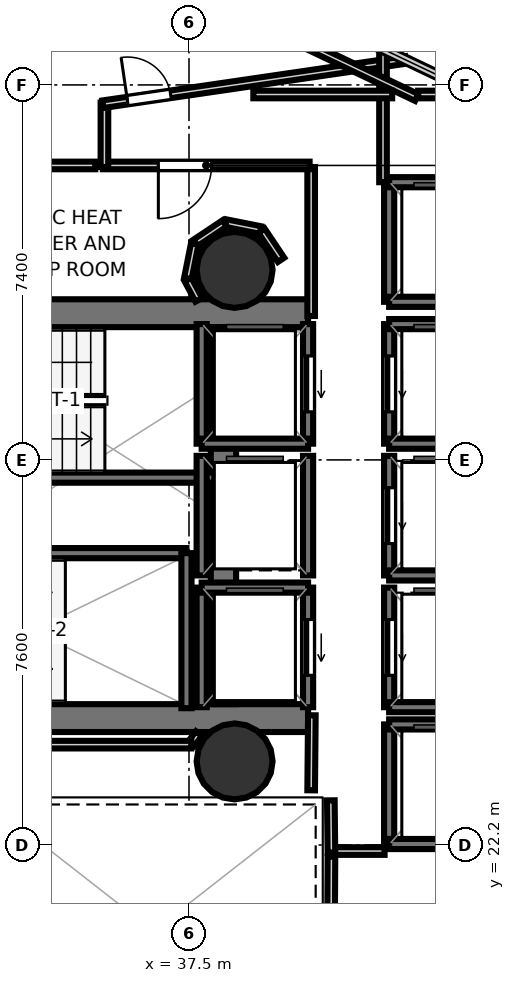
"""IFC4 building model, lengths in metres.
Left out: names, types, materials, properties, quantities, classifications, styles, units other than length and angle.
Written with IfcOpenShell. Run it as: python <this file> out.ifc"""

import sys

from ifc_helpers import new_model, si_unit, direction, frame, frame_2d, origin, origin_2d, place, context, subcontext, project, spatial, rectangle, hollow_circle, extrude, element, fill, save


model = new_model("IFC4")
c1 = context("Model", 3, precision=1e-05, world=origin(), true_north=direction((0.0, 1.0)))
c2 = subcontext(c1, "Body", "Model", "MODEL_VIEW")
j1 = project(units=[si_unit("LENGTHUNIT", "METRE"), si_unit("PLANEANGLEUNIT", "RADIAN")], contexts=[c1])
p1 = place(None, origin())
s1 = spatial("IfcSite", under=j1, at=p1, CompositionType="ELEMENT")
p2 = place(p1, origin())
s2 = spatial("IfcBuilding", under=s1, at=p2, CompositionType="ELEMENT")
p3 = place(p2, frame((0.0, 0.0, 138.5)))
s3 = spatial("IfcBuildingStorey", under=s2, at=p3, CompositionType="ELEMENT", Elevation=138.5)
p4 = place(p3, frame((29.23, 32.695, 0.0), z_axis=(0.0, 0.0, 1.0), x_axis=(1.0, 0.0, 0.0)))
e1 = element("IfcWall", 1, at=p4, inside=s3, PredefinedType="SHEAR", context=c2, shape_type="SweptSolid", body=[
    extrude(rectangle(XDim=10.62, YDim=0.55, at=frame_2d((5.31, 0.0))), origin(), (0.0, 0.0, 1.0), 4.38),
])
p5 = place(p4, frame((0.995, 0.0, 0.0)))
e2 = element("IfcOpeningElement", 2, at=p5, cuts=e1, PredefinedType="OPENING", context=c2, shape_type="SweptSolid", body=[
    extrude(rectangle(XDim=1.25, YDim=2.15, at=frame_2d((0.625, 1.075))), frame((0.0, 0.285, 0.0), z_axis=(0.0, -1.0, 0.0), x_axis=(1.0, 0.0, 0.0)), (0.0, 0.0, 1.0), 0.57),
])
p6 = place(p3, frame((29.23, 24.705, 0.0), z_axis=(0.0, 0.0, 1.0), x_axis=(1.0, 0.0, 0.0)))
e3 = element("IfcWall", 3, at=p6, inside=s3, PredefinedType="SHEAR", context=c2, shape_type="SweptSolid", body=[
    extrude(rectangle(XDim=10.62, YDim=0.55, at=frame_2d((5.31, 0.0))), origin(), (0.0, 0.0, 1.0), 4.38),
])
p7 = place(p6, frame((0.795, 0.0, 0.0)))
e4 = element("IfcOpeningElement", 4, at=p7, cuts=e3, PredefinedType="OPENING", context=c2, shape_type="SweptSolid", body=[
    extrude(rectangle(XDim=1.25, YDim=2.15, at=frame_2d((0.625, 1.075))), frame((0.0, 0.285, 0.0), z_axis=(0.0, -1.0, 0.0), x_axis=(1.0, 0.0, 0.0)), (0.0, 0.0, 1.0), 0.57),
])
p8 = place(p3, frame((38.18, 24.98, 0.0), z_axis=(0.0, 0.0, 1.0), x_axis=(0.0, 1.0, 0.0)))
e5 = element("IfcWall", 5, at=p8, inside=s3, PredefinedType="SHEAR", context=c2, shape_type="SweptSolid", body=[
    extrude(rectangle(XDim=7.44, YDim=0.5, at=frame_2d((3.72, 0.0))), origin(), (0.0, 0.0, 1.0), 4.38),
])
for number, where, z_axis, x_axis in (
    (6, (38.4, 33.55, 0.0), (0.0, 0.0, 1.0), (1.0, 0.0, 0.0)),
    (7, (38.4, 23.85, 0.0), (0.0, 0.0, 1.0), (1.0, 0.0, 0.0)),
):
    element("IfcColumn", number, at=place(p3, frame(where, z_axis=z_axis, x_axis=x_axis)), inside=s3, PredefinedType="COLUMN", context=c2, shape_type="SweptSolid", body=[
        extrude(hollow_circle(Radius=0.75, WallThickness=0.036, at=origin_2d()), origin(), (0.0, 0.0, 1.0), 4.6),
    ])
p9 = place(p3, frame((29.7, 29.45, 0.0), z_axis=(0.0, 0.0, 1.0), x_axis=(1.0, 0.0, 0.0)))
e8 = element("IfcWall", 8, at=p9, inside=s3, PredefinedType="SOLIDWALL", context=c2, shape_type="SweptSolid", body=[
    extrude(rectangle(XDim=8.3, YDim=0.2, at=frame_2d((4.15, 0.0))), origin(), (0.0, 0.0, 1.0), 4.38),
])
p10 = place(p3, frame((29.7, 27.96, 0.0), z_axis=(0.0, 0.0, 1.0), x_axis=(1.0, 0.0, 0.0)))
e9 = element("IfcWall", 9, at=p10, inside=s3, PredefinedType="SOLIDWALL", context=c2, shape_type="SweptSolid", body=[
    extrude(rectangle(XDim=7.75, YDim=0.2, at=frame_2d((3.875, 0.0))), origin(), (0.0, 0.0, 1.0), 4.38),
])
p11 = place(p3, frame((37.45, 24.9, 0.0), z_axis=(0.0, 0.0, 1.0), x_axis=(0.0, 1.0, 0.0)))
e10 = element("IfcWall", 10, at=p11, inside=s3, PredefinedType="SOLIDWALL", context=c2, shape_type="SweptSolid", body=[
    extrude(rectangle(XDim=3.06, YDim=0.2, at=frame_2d((1.53, 0.0))), origin(), (0.0, 0.0, 1.0), 4.38),
])
p12 = place(p3, frame((39.85, 30.12, 0.0), z_axis=(0.0, 0.0, 1.0), x_axis=(0.0, 1.0, 0.0)))
e11 = element("IfcWall", 11, at=p12, inside=s3, PredefinedType="SOLIDWALL", context=c2, shape_type="SweptSolid", body=[
    extrude(rectangle(XDim=2.36, YDim=0.2, at=frame_2d((1.18, 0.0))), origin(), (0.0, 0.0, 1.0), 4.38),
])
p13 = place(p12, frame((0.63, 0.0, 0.0)))
e12 = element("IfcOpeningElement", 12, at=p13, cuts=e11, PredefinedType="OPENING", context=c2, shape_type="SweptSolid", body=[
    extrude(rectangle(XDim=1.1, YDim=2.15, at=frame_2d((0.55, 1.075))), frame((0.0, 0.11, 0.0), z_axis=(0.0, -1.0, 0.0), x_axis=(1.0, 0.0, 0.0)), (0.0, 0.0, 1.0), 0.22),
])
p14 = place(p3, frame((37.75, 30.12, 0.0), z_axis=(0.0, 0.0, 1.0), x_axis=(0.0, 1.0, 0.0)))
e13 = element("IfcWall", 13, at=p14, inside=s3, PredefinedType="SOLIDWALL", context=c2, shape_type="SweptSolid", body=[
    extrude(rectangle(XDim=2.36, YDim=0.2, at=frame_2d((1.18, 0.0))), origin(), (0.0, 0.0, 1.0), 4.38),
])
p15 = place(p3, frame((37.75, 30.12, 0.0), z_axis=(0.0, 0.0, 1.0), x_axis=(1.0, 0.0, 0.0)))
e14 = element("IfcWall", 14, at=p15, inside=s3, PredefinedType="SOLIDWALL", context=c2, shape_type="SweptSolid", body=[
    extrude(rectangle(XDim=2.1, YDim=0.2, at=frame_2d((1.05, 0.0))), origin(), (0.0, 0.0, 1.0), 4.38),
])
p16 = place(p3, frame((39.85, 24.92, 0.0), z_axis=(0.0, 0.0, 1.0), x_axis=(0.0, 1.0, 0.0)))
e15 = element("IfcWall", 15, at=p16, inside=s3, PredefinedType="SOLIDWALL", context=c2, shape_type="SweptSolid", body=[
    extrude(rectangle(XDim=2.36, YDim=0.2, at=frame_2d((1.18, 0.0))), origin(), (0.0, 0.0, 1.0), 4.38),
])
p17 = place(p16, frame((0.63, 0.0, 0.0)))
e16 = element("IfcOpeningElement", 16, at=p17, cuts=e15, PredefinedType="OPENING", context=c2, shape_type="SweptSolid", body=[
    extrude(rectangle(XDim=1.1, YDim=2.15, at=frame_2d((0.55, 1.075))), frame((0.0, 0.11, 0.0), z_axis=(0.0, -1.0, 0.0), x_axis=(1.0, 0.0, 0.0)), (0.0, 0.0, 1.0), 0.22),
])
p18 = place(p3, frame((37.75, 24.92, 0.0), z_axis=(0.0, 0.0, 1.0), x_axis=(0.0, 1.0, 0.0)))
e17 = element("IfcWall", 17, at=p18, inside=s3, PredefinedType="SOLIDWALL", context=c2, shape_type="SweptSolid", body=[
    extrude(rectangle(XDim=2.36, YDim=0.2, at=frame_2d((1.18, 0.0))), origin(), (0.0, 0.0, 1.0), 4.38),
])
p19 = place(p3, frame((37.75, 27.28, 0.0), z_axis=(0.0, 0.0, 1.0), x_axis=(1.0, 0.0, 0.0)))
e18 = element("IfcWall", 18, at=p19, inside=s3, PredefinedType="SOLIDWALL", context=c2, shape_type="SweptSolid", body=[
    extrude(rectangle(XDim=2.1, YDim=0.2, at=frame_2d((1.05, 0.0))), origin(), (0.0, 0.0, 1.0), 4.38),
])
p20 = place(p3, frame((41.45, 30.12, 0.0), z_axis=(0.0, 0.0, 1.0), x_axis=(0.0, 1.0, 0.0)))
e19 = element("IfcWall", 19, at=p20, inside=s3, PredefinedType="SOLIDWALL", context=c2, shape_type="SweptSolid", body=[
    extrude(rectangle(XDim=2.36, YDim=0.2, at=frame_2d((1.18, 0.0))), origin(), (0.0, 0.0, 1.0), 4.38),
])
p21 = place(p20, frame((0.63, 0.0, 0.0)))
e20 = element("IfcOpeningElement", 20, at=p21, cuts=e19, PredefinedType="OPENING", context=c2, shape_type="SweptSolid", body=[
    extrude(rectangle(XDim=1.1, YDim=2.15, at=frame_2d((0.55, 1.075))), frame((0.0, 0.11, 0.0), z_axis=(0.0, -1.0, 0.0), x_axis=(1.0, 0.0, 0.0)), (0.0, 0.0, 1.0), 0.22),
])
for number, where, z_axis, x_axis in (
    (21, (41.45, 32.48, 0.0), (0.0, 0.0, 1.0), (1.0, 0.0, 0.0)),
    (22, (41.45, 30.12, 0.0), (0.0, 0.0, 1.0), (1.0, 0.0, 0.0)),
):
    element("IfcWall", number, at=place(p3, frame(where, z_axis=z_axis, x_axis=x_axis)), inside=s3, PredefinedType="SOLIDWALL", context=c2, shape_type="SweptSolid", body=[
        extrude(rectangle(XDim=2.1, YDim=0.2, at=frame_2d((1.05, 0.0))), origin(), (0.0, 0.0, 1.0), 4.38),
    ])
p22 = place(p3, frame((41.45, 27.52, 0.0), z_axis=(0.0, 0.0, 1.0), x_axis=(0.0, 1.0, 0.0)))
e23 = element("IfcWall", 23, at=p22, inside=s3, PredefinedType="SOLIDWALL", context=c2, shape_type="SweptSolid", body=[
    extrude(rectangle(XDim=2.36, YDim=0.2, at=frame_2d((1.18, 0.0))), origin(), (0.0, 0.0, 1.0), 4.38),
])
p23 = place(p22, frame((0.63, 0.0, 0.0)))
e24 = element("IfcOpeningElement", 24, at=p23, cuts=e23, PredefinedType="OPENING", context=c2, shape_type="SweptSolid", body=[
    extrude(rectangle(XDim=1.1, YDim=2.15, at=frame_2d((0.55, 1.075))), frame((0.0, 0.11, 0.0), z_axis=(0.0, -1.0, 0.0), x_axis=(1.0, 0.0, 0.0)), (0.0, 0.0, 1.0), 0.22),
])
p24 = place(p3, frame((41.45, 27.52, 0.0), z_axis=(0.0, 0.0, 1.0), x_axis=(1.0, 0.0, 0.0)))
e25 = element("IfcWall", 25, at=p24, inside=s3, PredefinedType="SOLIDWALL", context=c2, shape_type="SweptSolid", body=[
    extrude(rectangle(XDim=2.1, YDim=0.2, at=frame_2d((1.05, 0.0))), origin(), (0.0, 0.0, 1.0), 4.38),
])
p25 = place(p3, frame((41.45, 24.92, 0.0), z_axis=(0.0, 0.0, 1.0), x_axis=(0.0, 1.0, 0.0)))
e26 = element("IfcWall", 26, at=p25, inside=s3, PredefinedType="SOLIDWALL", context=c2, shape_type="SweptSolid", body=[
    extrude(rectangle(XDim=2.36, YDim=0.2, at=frame_2d((1.18, 0.0))), origin(), (0.0, 0.0, 1.0), 4.38),
])
p26 = place(p25, frame((0.63, 0.0, 0.0)))
e27 = element("IfcOpeningElement", 27, at=p26, cuts=e26, PredefinedType="OPENING", context=c2, shape_type="SweptSolid", body=[
    extrude(rectangle(XDim=1.1, YDim=2.15, at=frame_2d((0.55, 1.075))), frame((0.0, 0.11, 0.0), z_axis=(0.0, -1.0, 0.0), x_axis=(1.0, 0.0, 0.0)), (0.0, 0.0, 1.0), 0.22),
])
p27 = place(p3, frame((41.45, 24.92, 0.0), z_axis=(0.0, 0.0, 1.0), x_axis=(1.0, 0.0, 0.0)))
e28 = element("IfcWall", 28, at=p27, inside=s3, PredefinedType="SOLIDWALL", context=c2, shape_type="SweptSolid", body=[
    extrude(rectangle(XDim=2.1, YDim=0.2, at=frame_2d((1.05, 0.0))), origin(), (0.0, 0.0, 1.0), 4.38),
])
for number, where, z_axis, x_axis in (
    (29, (39.85, 27.52, 0.0), (0.0, 0.0, 1.0), (0.0, 1.0, 0.0)),
    (30, (37.75, 27.52, 0.0), (0.0, 0.0, 1.0), (0.0, 1.0, 0.0)),
):
    element("IfcWall", number, at=place(p3, frame(where, z_axis=z_axis, x_axis=x_axis)), inside=s3, PredefinedType="SOLIDWALL", context=c2, shape_type="SweptSolid", body=[
        extrude(rectangle(XDim=2.36, YDim=0.2, at=frame_2d((1.18, 0.0))), origin(), (0.0, 0.0, 1.0), 4.38),
    ])
p28 = place(p3, frame((41.45, 22.22, 0.0), z_axis=(0.0, 0.0, 1.0), x_axis=(0.0, 1.0, 0.0)))
e31 = element("IfcWall", 31, at=p28, inside=s3, PredefinedType="SOLIDWALL", context=c2, shape_type="SweptSolid", body=[
    extrude(rectangle(XDim=2.36, YDim=0.2, at=frame_2d((1.18, 0.0))), origin(), (0.0, 0.0, 1.0), 4.38),
])
for number, where, z_axis, x_axis in (
    (32, (41.45, 24.58, 0.0), (0.0, 0.0, 1.0), (1.0, 0.0, 0.0)),
    (33, (41.45, 22.22, 0.0), (0.0, 0.0, 1.0), (1.0, 0.0, 0.0)),
):
    element("IfcWall", number, at=place(p3, frame(where, z_axis=z_axis, x_axis=x_axis)), inside=s3, PredefinedType="SOLIDWALL", context=c2, shape_type="SweptSolid", body=[
        extrude(rectangle(XDim=2.1, YDim=0.2, at=frame_2d((1.05, 0.0))), origin(), (0.0, 0.0, 1.0), 4.38),
    ])
p29 = place(p3, frame((41.45, 32.92, 0.0), z_axis=(0.0, 0.0, 1.0), x_axis=(0.0, 1.0, 0.0)))
e34 = element("IfcWall", 34, at=p29, inside=s3, PredefinedType="SOLIDWALL", context=c2, shape_type="SweptSolid", body=[
    extrude(rectangle(XDim=2.36, YDim=0.2, at=frame_2d((1.18, 0.0))), origin(), (0.0, 0.0, 1.0), 4.38),
])
for number, where, z_axis, x_axis in (
    (35, (41.45, 35.28, 0.0), (0.0, 0.0, 1.0), (1.0, 0.0, 0.0)),
    (36, (41.45, 32.92, 0.0), (0.0, 0.0, 1.0), (1.0, 0.0, 0.0)),
):
    element("IfcWall", number, at=place(p3, frame(where, z_axis=z_axis, x_axis=x_axis)), inside=s3, PredefinedType="SOLIDWALL", context=c2, shape_type="SweptSolid", body=[
        extrude(rectangle(XDim=2.1, YDim=0.2, at=frame_2d((1.05, 0.0))), origin(), (0.0, 0.0, 1.0), 4.38),
    ])
p30 = place(p3, frame((39.911, 32.64, 0.0), z_axis=(0.0, 0.0, 1.0), x_axis=(0.0, 1.0, 0.0)))
e37 = element("IfcWall", 37, at=p30, inside=s3, PredefinedType="PARTITIONING", context=c2, shape_type="SweptSolid", body=[
    extrude(rectangle(XDim=2.94, YDim=0.15, at=frame_2d((1.47, 0.0))), origin(), (0.0, 0.0, 1.0), 2.9),
])
p31 = place(p3, frame((39.88, 35.611, 0.0), z_axis=(0.0, 0.0, 1.0), x_axis=(-1.0, 0.0, 0.0)))
e38 = element("IfcWall", 38, at=p31, inside=s3, PredefinedType="PARTITIONING", context=c2, shape_type="SweptSolid", body=[
    extrude(rectangle(XDim=4.08, YDim=0.15, at=frame_2d((2.04, 0.0))), origin(), (0.0, 0.0, 1.0), 2.9),
])
p32 = place(p31, frame((1.935, 0.0, 0.0)))
e39 = element("IfcOpeningElement", 39, at=p32, cuts=e38, PredefinedType="OPENING", context=c2, shape_type="SweptSolid", body=[
    extrude(rectangle(XDim=1.05, YDim=2.15, at=frame_2d((0.525, 1.075))), frame((0.0, 0.085, 0.0), z_axis=(0.0, -1.0, 0.0), x_axis=(1.0, 0.0, 0.0)), (0.0, 0.0, 1.0), 0.17),
])
p33 = place(p3, frame((35.831, 35.58, 0.0), z_axis=(0.0, 0.0, 1.0), x_axis=(0.0, 1.0, 0.0)))
e40 = element("IfcWall", 40, at=p33, inside=s3, PredefinedType="PARTITIONING", context=c2, shape_type="SweptSolid", body=[
    extrude(rectangle(XDim=1.27, YDim=0.15, at=frame_2d((0.635, 0.0))), origin(), (0.0, 0.0, 1.0), 2.9),
])
p34 = place(p3, frame((35.8, 36.819, 0.0), z_axis=(0.0, 0.0, 1.0), x_axis=(0.98946360637, 0.144781807109, 0.0)))
e41 = element("IfcWall", 41, at=p34, inside=s3, PredefinedType="PARTITIONING", context=c2, shape_type="SweptSolid", body=[
    extrude(rectangle(XDim=6.04, YDim=0.15, at=frame_2d((3.02, 0.0))), origin(), (0.0, 0.0, 1.0), 2.9),
])
p35 = place(p34, frame((0.49, 0.0, 0.0)))
e42 = element("IfcOpeningElement", 42, at=p35, cuts=e41, PredefinedType="OPENING", context=c2, shape_type="SweptSolid", body=[
    extrude(rectangle(XDim=0.86, YDim=2.05, at=frame_2d((0.43, 1.025))), frame((0.0, 0.085, 0.0), z_axis=(0.0, -1.0, 0.0), x_axis=(1.0, 0.0, 0.0)), (0.0, 0.0, 1.0), 0.17),
])
p36 = place(p3, frame((41.329, 37.927, 0.0), z_axis=(0.0, 0.0, 1.0), x_axis=(0.0, -1.0, 0.0)))
e43 = element("IfcWall", 43, at=p36, inside=s3, PredefinedType="PARTITIONING", context=c2, shape_type="SweptSolid", body=[
    extrude(rectangle(XDim=2.647, YDim=0.15, at=frame_2d((1.323, 0.0))), origin(), (0.0, 0.0, 1.0), 2.9),
])
p37 = place(p3, frame((41.36, 22.081, 0.0), z_axis=(0.0, 0.0, 1.0), x_axis=(-1.0, 0.0, 0.0)))
e44 = element("IfcWall", 44, at=p37, inside=s3, PredefinedType="PARTITIONING", context=c2, shape_type="SweptSolid", body=[
    extrude(rectangle(XDim=1.08, YDim=0.15, at=frame_2d((0.54, 0.0))), origin(), (0.0, 0.0, 1.0), 2.9),
])
p38 = place(p3, frame((40.311, 22.05, 0.0), z_axis=(0.0, 0.0, 1.0), x_axis=(-0.011836292006, 0.999929948642, 0.0)))
e45 = element("IfcWall", 45, at=p38, inside=s3, PredefinedType="PARTITIONING", context=c2, shape_type="SweptSolid", body=[
    extrude(rectangle(XDim=1.031, YDim=0.15, at=frame_2d((0.516, 0.0))), origin(), (0.0, 0.0, 1.0), 2.9),
])
p39 = place(p3, frame((39.911, 23.28, 0.0), z_axis=(0.0, 0.0, 1.0), x_axis=(0.009397771291, 0.999955839972, 0.0)))
e46 = element("IfcWall", 46, at=p39, inside=s3, PredefinedType="PARTITIONING", context=c2, shape_type="SweptSolid", body=[
    extrude(rectangle(XDim=1.481, YDim=0.15, at=frame_2d((0.74, 0.0))), origin(), (0.0, 0.0, 1.0), 2.9),
])
p40 = place(p3, frame((37.697, 24.399, 0.0), z_axis=(0.0, 0.0, 1.0), x_axis=(-0.60763139403, -0.794219169367, 0.0)))
e47 = element("IfcWall", 47, at=p40, inside=s3, PredefinedType="PARTITIONING", context=c2, shape_type="SweptSolid", body=[
    extrude(rectangle(XDim=0.25, YDim=0.15, at=frame_2d((0.125, 0.0))), origin(), (0.0, 0.0, 1.0), 2.9),
])
p41 = place(p3, frame((37.545, 24.181, 0.0), z_axis=(0.0, 0.0, 1.0), x_axis=(-1.0, 0.0, 0.0)))
e48 = element("IfcWall", 48, at=p41, inside=s3, PredefinedType="PARTITIONING", context=c2, shape_type="SweptSolid", body=[
    extrude(rectangle(XDim=4.015, YDim=0.15, at=frame_2d((2.007, 0.0))), origin(), (0.0, 0.0, 1.0), 2.9),
])
p42 = place(p3, frame((31.811, 41.803, 0.0), z_axis=(0.0, 0.0, 1.0), x_axis=(0.902784485902, -0.43009321317, 0.0)))
e49 = element("IfcWall", 49, at=p42, inside=s3, PredefinedType="PARTITIONING", context=c2, shape_type="SweptSolid", body=[
    extrude(rectangle(XDim=11.279, YDim=0.15, at=frame_2d((5.64, 0.0))), origin(), (0.0, 0.0, 1.0), 2.9),
])
p43 = place(p3, frame((41.51, 37.011, 0.0), z_axis=(0.0, 0.0, 1.0), x_axis=(-1.0, 0.0, 0.0)))
e50 = element("IfcWall", 50, at=p43, inside=s3, PredefinedType="PARTITIONING", context=c2, shape_type="SweptSolid", body=[
    extrude(rectangle(XDim=2.74, YDim=0.15, at=frame_2d((1.37, 0.0))), origin(), (0.0, 0.0, 1.0), 2.9),
])
p44 = place(p3, frame((35.65, 35.611, 0.0), z_axis=(0.0, 0.0, 1.0), x_axis=(-1.0, 0.0, 0.0)))
e51 = element("IfcWall", 51, at=p44, inside=s3, PredefinedType="PARTITIONING", context=c2, shape_type="SweptSolid", body=[
    extrude(rectangle(XDim=3.23, YDim=0.15, at=frame_2d((1.615, 0.0))), origin(), (0.0, 0.0, 1.0), 2.9),
])
p45 = place(p3, frame((40.29, 17.893, 0.0), z_axis=(0.0, 0.0, 1.0), x_axis=(0.005209510146, 0.99998643041, 0.0)))
e52 = element("IfcWall", 52, at=p45, inside=s3, PredefinedType="PARTITIONING", context=c2, shape_type="SweptSolid", body=[
    extrude(rectangle(XDim=4.077, YDim=0.15, at=frame_2d((2.039, 0.0))), origin(), (0.0, 0.0, 1.0), 2.9),
])
p46 = place(p3, frame((39.317, 33.748, 0.0), z_axis=(0.0, 0.0, 1.0), x_axis=(-0.556649926744, 0.830747169153, 0.0)))
e53 = element("IfcWall", 53, at=p46, inside=s3, PredefinedType="PARTITIONING", context=c2, shape_type="SweptSolid", body=[
    extrude(rectangle(XDim=0.693, YDim=0.15, at=frame_2d((0.346, 0.0))), origin(), (0.0, 0.0, 1.0), 2.9),
])
p47 = place(p3, frame((38.912, 34.337, 0.0), z_axis=(0.0, 0.0, 1.0), x_axis=(-0.98075554424, 0.195239756305, 0.0)))
e54 = element("IfcWall", 54, at=p47, inside=s3, PredefinedType="PARTITIONING", context=c2, shape_type="SweptSolid", body=[
    extrude(rectangle(XDim=0.697, YDim=0.15, at=frame_2d((0.348, 0.0))), origin(), (0.0, 0.0, 1.0), 2.9),
])
p48 = place(p3, frame((38.205, 34.468, 0.0), z_axis=(0.0, 0.0, 1.0), x_axis=(-0.831348365513, -0.555751648814, 0.0)))
e55 = element("IfcWall", 55, at=p48, inside=s3, PredefinedType="PARTITIONING", context=c2, shape_type="SweptSolid", body=[
    extrude(rectangle(XDim=0.696, YDim=0.15, at=frame_2d((0.348, 0.0))), origin(), (0.0, 0.0, 1.0), 2.9),
])
p49 = place(p3, frame((37.613, 34.062, 0.0), z_axis=(0.0, 0.0, 1.0), x_axis=(-0.195239756305, -0.98075554424, 0.0)))
e56 = element("IfcWall", 56, at=p49, inside=s3, PredefinedType="PARTITIONING", context=c2, shape_type="SweptSolid", body=[
    extrude(rectangle(XDim=0.697, YDim=0.15, at=frame_2d((0.348, 0.0))), origin(), (0.0, 0.0, 1.0), 2.9),
])
p50 = place(p3, frame((37.48, 33.358, 0.0), z_axis=(0.0, 0.0, 1.0), x_axis=(0.471593841364, -0.881815881455, 0.0)))
e57 = element("IfcWall", 57, at=p50, inside=s3, PredefinedType="PARTITIONING", context=c2, shape_type="SweptSolid", body=[
    extrude(rectangle(XDim=0.454, YDim=0.15, at=frame_2d((0.227, 0.0))), origin(), (0.0, 0.0, 1.0), 2.9),
])
p51 = place(p3, frame((43.229, 37.011, 0.0), z_axis=(0.0, 0.0, 1.0), x_axis=(-1.0, 0.0, 0.0)))
e58 = element("IfcWall", 58, at=p51, inside=s3, PredefinedType="PARTITIONING", context=c2, shape_type="SweptSolid", body=[
    extrude(rectangle(XDim=1.208, YDim=0.15, at=frame_2d((0.604, 0.0))), origin(), (0.0, 0.0, 1.0), 2.9),
])
p52 = place(p13, origin())
e59 = element("IfcDoor", 59, at=p52, inside=s3, OperationType="SLIDING_TO_LEFT", PredefinedType="DOOR", context=c2, shape_type="SweptSolid", body=[
    extrude(rectangle(XDim=1.1, YDim=2.15, at=frame_2d((0.55, 1.075))), frame((0.0, 0.025, 0.0), z_axis=(0.0, -1.0, 0.0), x_axis=(1.0, 0.0, 0.0)), (0.0, 0.0, 1.0), 0.05),
])
fill(e12, e59)
p53 = place(p17, origin())
e60 = element("IfcDoor", 60, at=p53, inside=s3, OperationType="SLIDING_TO_LEFT", PredefinedType="DOOR", context=c2, shape_type="SweptSolid", body=[
    extrude(rectangle(XDim=1.1, YDim=2.15, at=frame_2d((0.55, 1.075))), frame((0.0, 0.025, 0.0), z_axis=(0.0, -1.0, 0.0), x_axis=(1.0, 0.0, 0.0)), (0.0, 0.0, 1.0), 0.05),
])
fill(e16, e60)
p54 = place(p21, origin())
e61 = element("IfcDoor", 61, at=p54, inside=s3, OperationType="SLIDING_TO_LEFT", PredefinedType="DOOR", context=c2, shape_type="SweptSolid", body=[
    extrude(rectangle(XDim=1.1, YDim=2.15, at=frame_2d((0.55, 1.075))), frame((0.0, 0.025, 0.0), z_axis=(0.0, -1.0, 0.0), x_axis=(1.0, 0.0, 0.0)), (0.0, 0.0, 1.0), 0.05),
])
fill(e20, e61)
p55 = place(p23, origin())
e62 = element("IfcDoor", 62, at=p55, inside=s3, OperationType="SLIDING_TO_LEFT", PredefinedType="DOOR", context=c2, shape_type="SweptSolid", body=[
    extrude(rectangle(XDim=1.1, YDim=2.15, at=frame_2d((0.55, 1.075))), frame((0.0, 0.025, 0.0), z_axis=(0.0, -1.0, 0.0), x_axis=(1.0, 0.0, 0.0)), (0.0, 0.0, 1.0), 0.05),
])
fill(e24, e62)
p56 = place(p26, origin())
e63 = element("IfcDoor", 63, at=p56, inside=s3, OperationType="SLIDING_TO_LEFT", PredefinedType="DOOR", context=c2, shape_type="SweptSolid", body=[
    extrude(rectangle(XDim=1.1, YDim=2.15, at=frame_2d((0.55, 1.075))), frame((0.0, 0.025, 0.0), z_axis=(0.0, -1.0, 0.0), x_axis=(1.0, 0.0, 0.0)), (0.0, 0.0, 1.0), 0.05),
])
fill(e27, e63)
p57 = place(p35, origin())
e64 = element("IfcDoor", 64, at=p57, inside=s3, OperationType="SINGLE_SWING_LEFT", PredefinedType="DOOR", context=c2, shape_type="SweptSolid", body=[
    extrude(rectangle(XDim=0.86, YDim=2.05, at=frame_2d((0.43, 1.025))), frame((0.0, 0.025, 0.0), z_axis=(0.0, -1.0, 0.0), x_axis=(1.0, 0.0, 0.0)), (0.0, 0.0, 1.0), 0.05),
])
fill(e42, e64)
p58 = place(p32, origin())
e65 = element("IfcDoor", 65, at=p58, inside=s3, OperationType="SINGLE_SWING_RIGHT", PredefinedType="DOOR", context=c2, shape_type="SweptSolid", body=[
    extrude(rectangle(XDim=1.05, YDim=2.15, at=frame_2d((0.525, 1.075))), frame((0.0, 0.025, 0.0), z_axis=(0.0, -1.0, 0.0), x_axis=(1.0, 0.0, 0.0)), (0.0, 0.0, 1.0), 0.05),
])
fill(e39, e65)
save(model, sys.argv[1])
